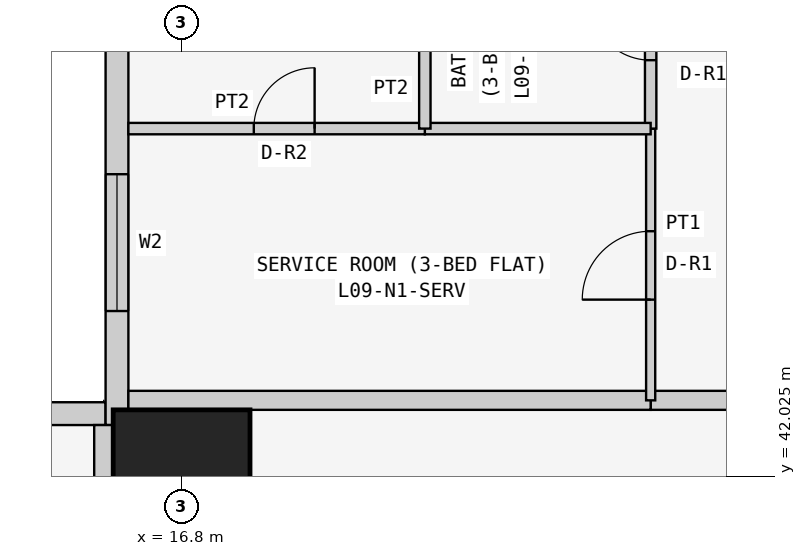
"""IFC4 building model, lengths in metres.
Left out: names, types, materials, properties, quantities, classifications, styles, units other than length and angle.
Written with IfcOpenShell. Run it as: python <this file> out.ifc"""

import sys

from ifc_helpers import new_model, si_unit, direction, frame, frame_2d, origin, origin_2d, place, context, subcontext, project, spatial, rectangle, extrude, element, fill, save


model = new_model("IFC4")
c1 = context("Model", 3, precision=1e-05, world=origin(), true_north=direction((0.0, 1.0)))
c2 = subcontext(c1, "Body", "Model", "MODEL_VIEW")
j1 = project(units=[si_unit("LENGTHUNIT", "METRE"), si_unit("PLANEANGLEUNIT", "RADIAN")], contexts=[c1])
p1 = place(None, origin())
s1 = spatial("IfcSite", under=j1, at=p1, CompositionType="ELEMENT")
p2 = place(p1, origin())
s2 = spatial("IfcBuilding", under=s1, at=p2, CompositionType="ELEMENT")
p3 = place(p2, frame((0.0, 0.0, 41.7)))
s3 = spatial("IfcBuildingStorey", under=s2, at=p3, CompositionType="ELEMENT", Elevation=41.7)
p4 = place(p3, frame((16.8, 42.0, 0.0), z_axis=(0.0, 0.0, 1.0), x_axis=(1.0, 0.0, 0.0)))
e1 = element("IfcColumn", 1, at=p4, inside=s3, PredefinedType="COLUMN", context=c2, shape_type="SweptSolid", body=[
    extrude(rectangle(XDim=1.8, YDim=1.8, at=origin_2d()), origin(), (0.0, 0.0, 1.0), 3.6),
])
p5 = place(p3, frame((15.8, 42.85, 0.0), z_axis=(0.0, 0.0, 1.0), x_axis=(-1.0, 0.0, 0.0)))
e2 = element("IfcWall", 2, at=p5, inside=s3, PredefinedType="SOLIDWALL", context=c2, shape_type="SweptSolid", body=[
    extrude(rectangle(XDim=15.4, YDim=0.3, at=frame_2d((7.7, 0.0))), origin(), (0.0, 0.0, 1.0), 3.45),
])
p6 = place(p5, frame((1.2, 0.0, 0.9)))
e3 = element("IfcOpeningElement", 3, at=p6, cuts=e2, PredefinedType="OPENING", context=c2, shape_type="SweptSolid", body=[
    extrude(rectangle(XDim=1.8, YDim=1.5, at=frame_2d((0.9, 0.75))), frame((0.0, 0.16, 0.0), z_axis=(0.0, -1.0, 0.0), x_axis=(1.0, 0.0, 0.0)), (0.0, 0.0, 1.0), 0.32),
])
p7 = place(p5, frame((4.95, 0.0, 1.5)))
e4 = element("IfcOpeningElement", 4, at=p7, cuts=e2, PredefinedType="OPENING", context=c2, shape_type="SweptSolid", body=[
    extrude(rectangle(XDim=0.9, YDim=0.7, at=frame_2d((0.45, 0.35))), frame((0.0, 0.16, 0.0), z_axis=(0.0, -1.0, 0.0), x_axis=(1.0, 0.0, 0.0)), (0.0, 0.0, 1.0), 0.32),
])
p8 = place(p5, frame((8.5, 0.0, 0.9)))
e5 = element("IfcOpeningElement", 5, at=p8, cuts=e2, PredefinedType="OPENING", context=c2, shape_type="SweptSolid", body=[
    extrude(rectangle(XDim=1.8, YDim=1.5, at=frame_2d((0.9, 0.75))), frame((0.0, 0.16, 0.0), z_axis=(0.0, -1.0, 0.0), x_axis=(1.0, 0.0, 0.0)), (0.0, 0.0, 1.0), 0.32),
])
p9 = place(p5, frame((12.5, 0.0, 0.0)))
e6 = element("IfcOpeningElement", 6, at=p9, cuts=e2, PredefinedType="OPENING", context=c2, shape_type="SweptSolid", body=[
    extrude(rectangle(XDim=0.9, YDim=2.4, at=frame_2d((0.45, 1.2))), frame((0.0, 0.16, 0.0), z_axis=(0.0, -1.0, 0.0), x_axis=(1.0, 0.0, 0.0)), (0.0, 0.0, 1.0), 0.32),
])
p10 = place(p5, frame((13.5, 0.0, 0.9)))
e7 = element("IfcOpeningElement", 7, at=p10, cuts=e2, PredefinedType="OPENING", context=c2, shape_type="SweptSolid", body=[
    extrude(rectangle(XDim=1.2, YDim=1.5, at=frame_2d((0.6, 0.75))), frame((0.0, 0.16, 0.0), z_axis=(0.0, -1.0, 0.0), x_axis=(1.0, 0.0, 0.0)), (0.0, 0.0, 1.0), 0.32),
])
p11 = place(p3, frame((15.95, 58.4, 0.0), z_axis=(0.0, 0.0, 1.0), x_axis=(0.0, -1.0, 0.0)))
e8 = element("IfcWall", 8, at=p11, inside=s3, PredefinedType="SOLIDWALL", context=c2, shape_type="SweptSolid", body=[
    extrude(rectangle(XDim=15.7, YDim=0.3, at=frame_2d((7.85, 0.0))), origin(), (0.0, 0.0, 1.0), 3.45),
])
p12 = place(p11, frame((12.4, 0.0, 0.9)))
e9 = element("IfcOpeningElement", 9, at=p12, cuts=e8, PredefinedType="OPENING", context=c2, shape_type="SweptSolid", body=[
    extrude(rectangle(XDim=1.8, YDim=1.5, at=frame_2d((0.9, 0.75))), frame((0.0, 0.16, 0.0), z_axis=(0.0, -1.0, 0.0), x_axis=(1.0, 0.0, 0.0)), (0.0, 0.0, 1.0), 0.32),
])
p13 = place(p11, frame((9.55, 0.0, 1.5)))
e10 = element("IfcOpeningElement", 10, at=p13, cuts=e8, PredefinedType="OPENING", context=c2, shape_type="SweptSolid", body=[
    extrude(rectangle(XDim=0.9, YDim=0.7, at=frame_2d((0.45, 0.35))), frame((0.0, 0.16, 0.0), z_axis=(0.0, -1.0, 0.0), x_axis=(1.0, 0.0, 0.0)), (0.0, 0.0, 1.0), 0.32),
])
p14 = place(p11, frame((5.1, 0.0, 0.9)))
e11 = element("IfcOpeningElement", 11, at=p14, cuts=e8, PredefinedType="OPENING", context=c2, shape_type="SweptSolid", body=[
    extrude(rectangle(XDim=1.8, YDim=1.5, at=frame_2d((0.9, 0.75))), frame((0.0, 0.16, 0.0), z_axis=(0.0, -1.0, 0.0), x_axis=(1.0, 0.0, 0.0)), (0.0, 0.0, 1.0), 0.32),
])
p15 = place(p11, frame((2.0, 0.0, 0.0)))
e12 = element("IfcOpeningElement", 12, at=p15, cuts=e8, PredefinedType="OPENING", context=c2, shape_type="SweptSolid", body=[
    extrude(rectangle(XDim=0.9, YDim=2.4, at=frame_2d((0.45, 1.2))), frame((0.0, 0.16, 0.0), z_axis=(0.0, -1.0, 0.0), x_axis=(1.0, 0.0, 0.0)), (0.0, 0.0, 1.0), 0.32),
])
p16 = place(p11, frame((0.7, 0.0, 0.9)))
e13 = element("IfcOpeningElement", 13, at=p16, cuts=e8, PredefinedType="OPENING", context=c2, shape_type="SweptSolid", body=[
    extrude(rectangle(XDim=1.2, YDim=1.5, at=frame_2d((0.6, 0.75))), frame((0.0, 0.16, 0.0), z_axis=(0.0, -1.0, 0.0), x_axis=(1.0, 0.0, 0.0)), (0.0, 0.0, 1.0), 0.32),
])
p17 = place(p3, frame((22.971, 43.025, 0.0), z_axis=(0.0, 0.0, 1.0), x_axis=(1.0, 0.0, 0.0)))
e14 = element("IfcWall", 14, at=p17, inside=s3, PredefinedType="PARTITIONING", context=c2, shape_type="SweptSolid", body=[
    extrude(rectangle(XDim=1.2, YDim=0.25, at=frame_2d((0.6, 0.0))), origin(), (0.0, 0.0, 1.0), 3.45),
])
p18 = place(p3, frame((16.1, 43.025, 0.0), z_axis=(0.0, 0.0, 1.0), x_axis=(1.0, 0.0, 0.0)))
e15 = element("IfcWall", 15, at=p18, inside=s3, PredefinedType="PARTITIONING", context=c2, shape_type="SweptSolid", body=[
    extrude(rectangle(XDim=6.871, YDim=0.25, at=frame_2d((3.436, 0.0))), origin(), (0.0, 0.0, 1.0), 3.45),
])
p19 = place(p3, frame((15.775, 36.229, 0.0), z_axis=(0.0, 0.0, 1.0), x_axis=(0.0, 1.0, 0.0)))
e16 = element("IfcWall", 16, at=p19, inside=s3, PredefinedType="PARTITIONING", context=c2, shape_type="SweptSolid", body=[
    extrude(rectangle(XDim=6.471, YDim=0.25, at=frame_2d((3.235, 0.0))), origin(), (0.0, 0.0, 1.0), 3.45),
])
p20 = place(p3, frame((22.971, 46.6, 0.0), z_axis=(0.0, 0.0, 1.0), x_axis=(0.0, -1.0, 0.0)))
e17 = element("IfcWall", 17, at=p20, inside=s3, PredefinedType="PARTITIONING", context=c2, shape_type="SweptSolid", body=[
    extrude(rectangle(XDim=3.575, YDim=0.12, at=frame_2d((1.788, 0.0))), origin(), (0.0, 0.0, 1.0), 3.45),
])
p21 = place(p20, frame((1.35, 0.0, 0.0)))
e18 = element("IfcOpeningElement", 18, at=p21, cuts=e17, PredefinedType="OPENING", context=c2, shape_type="SweptSolid", body=[
    extrude(rectangle(XDim=0.9, YDim=2.1, at=frame_2d((0.45, 1.05))), frame((0.0, 0.07, 0.0), z_axis=(0.0, -1.0, 0.0), x_axis=(1.0, 0.0, 0.0)), (0.0, 0.0, 1.0), 0.14),
])
p22 = place(p3, frame((22.971, 49.2, 0.0), z_axis=(0.0, 0.0, 1.0), x_axis=(0.0, -1.0, 0.0)))
e19 = element("IfcWall", 19, at=p22, inside=s3, PredefinedType="PARTITIONING", context=c2, shape_type="SweptSolid", body=[
    extrude(rectangle(XDim=2.6, YDim=0.15, at=frame_2d((1.3, 0.0))), origin(), (0.0, 0.0, 1.0), 3.45),
])
p23 = place(p22, frame((0.9, 0.0, 0.0)))
e20 = element("IfcOpeningElement", 20, at=p23, cuts=e19, PredefinedType="OPENING", context=c2, shape_type="SweptSolid", body=[
    extrude(rectangle(XDim=0.8, YDim=2.1, at=frame_2d((0.4, 1.05))), frame((0.0, 0.085, 0.0), z_axis=(0.0, -1.0, 0.0), x_axis=(1.0, 0.0, 0.0)), (0.0, 0.0, 1.0), 0.17),
])
p24 = place(p3, frame((22.971, 46.6, 0.0), z_axis=(0.0, 0.0, 1.0), x_axis=(-1.0, 0.0, 0.0)))
e21 = element("IfcWall", 21, at=p24, inside=s3, PredefinedType="PARTITIONING", context=c2, shape_type="SweptSolid", body=[
    extrude(rectangle(XDim=2.971, YDim=0.15, at=frame_2d((1.485, 0.0))), origin(), (0.0, 0.0, 1.0), 3.45),
])
p25 = place(p3, frame((20.0, 46.6, 0.0), z_axis=(0.0, 0.0, 1.0), x_axis=(-1.0, 0.0, 0.0)))
e22 = element("IfcWall", 22, at=p25, inside=s3, PredefinedType="PARTITIONING", context=c2, shape_type="SweptSolid", body=[
    extrude(rectangle(XDim=3.9, YDim=0.15, at=frame_2d((1.95, 0.0))), origin(), (0.0, 0.0, 1.0), 3.45),
])
p26 = place(p25, frame((1.45, 0.0, 0.0)))
e23 = element("IfcOpeningElement", 23, at=p26, cuts=e22, PredefinedType="OPENING", context=c2, shape_type="SweptSolid", body=[
    extrude(rectangle(XDim=0.8, YDim=2.1, at=frame_2d((0.4, 1.05))), frame((0.0, 0.085, 0.0), z_axis=(0.0, -1.0, 0.0), x_axis=(1.0, 0.0, 0.0)), (0.0, 0.0, 1.0), 0.17),
])
p27 = place(p3, frame((20.0, 49.2, 0.0), z_axis=(0.0, 0.0, 1.0), x_axis=(0.0, -1.0, 0.0)))
e24 = element("IfcWall", 24, at=p27, inside=s3, PredefinedType="PARTITIONING", context=c2, shape_type="SweptSolid", body=[
    extrude(rectangle(XDim=2.6, YDim=0.15, at=frame_2d((1.3, 0.0))), origin(), (0.0, 0.0, 1.0), 3.45),
])
p28 = place(p12, origin())
e25 = element("IfcWindow", 25, at=p28, inside=s3, PartitioningType="SINGLE_PANEL", PredefinedType="WINDOW", context=c2, shape_type="SweptSolid", body=[
    extrude(rectangle(XDim=1.8, YDim=1.5, at=frame_2d((0.9, 0.75))), frame((0.0, 0.03, 0.0), z_axis=(0.0, -1.0, 0.0), x_axis=(1.0, 0.0, 0.0)), (0.0, 0.0, 1.0), 0.06),
])
fill(e9, e25)
p29 = place(p21, frame((0.9, 0.0, 0.0), z_axis=(0.0, 0.0, 1.0), x_axis=(-1.0, 0.0, 0.0)))
e26 = element("IfcDoor", 26, at=p29, inside=s3, OperationType="SINGLE_SWING_LEFT", PredefinedType="DOOR", context=c2, shape_type="SweptSolid", body=[
    extrude(rectangle(XDim=0.9, YDim=2.1, at=frame_2d((0.45, 1.05))), frame((0.0, 0.025, 0.0), z_axis=(0.0, -1.0, 0.0), x_axis=(1.0, 0.0, 0.0)), (0.0, 0.0, 1.0), 0.05),
])
fill(e18, e26)
p30 = place(p26, frame((0.8, 0.0, 0.0), z_axis=(0.0, 0.0, 1.0), x_axis=(-1.0, 0.0, 0.0)))
e27 = element("IfcDoor", 27, at=p30, inside=s3, OperationType="SINGLE_SWING_RIGHT", PredefinedType="DOOR", context=c2, shape_type="SweptSolid", body=[
    extrude(rectangle(XDim=0.8, YDim=2.1, at=frame_2d((0.4, 1.05))), frame((0.0, 0.025, 0.0), z_axis=(0.0, -1.0, 0.0), x_axis=(1.0, 0.0, 0.0)), (0.0, 0.0, 1.0), 0.05),
])
fill(e23, e27)
p31 = place(p23, frame((0.8, 0.0, 0.0), z_axis=(0.0, 0.0, 1.0), x_axis=(-1.0, 0.0, 0.0)))
e28 = element("IfcDoor", 28, at=p31, inside=s3, OperationType="SINGLE_SWING_RIGHT", PredefinedType="DOOR", context=c2, shape_type="SweptSolid", body=[
    extrude(rectangle(XDim=0.8, YDim=2.1, at=frame_2d((0.4, 1.05))), frame((0.0, 0.025, 0.0), z_axis=(0.0, -1.0, 0.0), x_axis=(1.0, 0.0, 0.0)), (0.0, 0.0, 1.0), 0.05),
])
fill(e20, e28)
save(model, sys.argv[1])
